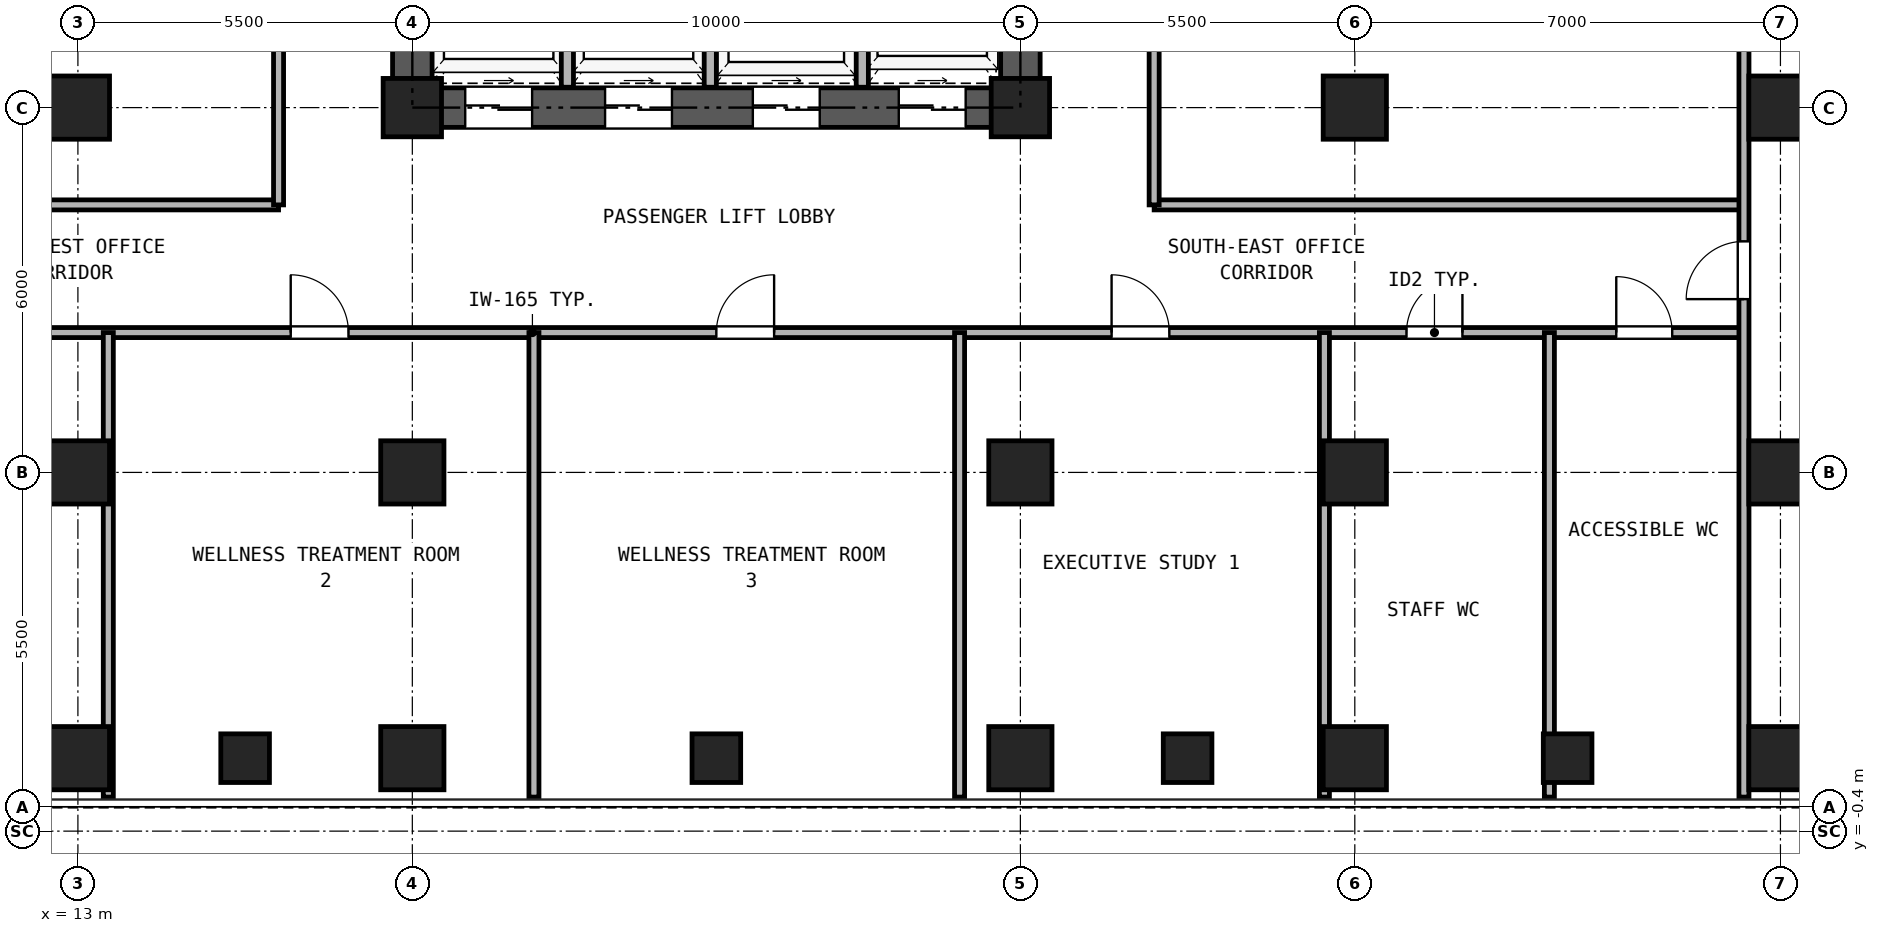
"""IFC4 building model, lengths in metres.
Left out: names, types, materials, properties, quantities, classifications, styles, units other than length and angle.
Written with IfcOpenShell. Run it as: python <this file> out.ifc"""

import sys

from ifc_helpers import new_model, si_unit, direction, frame, frame_2d, origin, origin_2d, place, context, subcontext, project, spatial, rectangle, hollow_rectangle, extrude, source, transform, mapped, element, fill, save


model = new_model("IFC4")
c1 = context("Model", 3, precision=1e-05, world=origin(), true_north=direction((0.0, 1.0)))
c2 = subcontext(c1, "Body", "Model", "MODEL_VIEW")
j1 = project(units=[si_unit("LENGTHUNIT", "METRE"), si_unit("PLANEANGLEUNIT", "RADIAN")], contexts=[c1])
p1 = place(None, origin())
s1 = spatial("IfcSite", under=j1, at=p1, CompositionType="ELEMENT")
p2 = place(p1, origin())
s2 = spatial("IfcBuilding", under=s1, at=p2, CompositionType="ELEMENT")
p3 = place(p2, frame((0.0, 0.0, 81.0)))
s3 = spatial("IfcBuildingStorey", under=s2, at=p3, CompositionType="ELEMENT", Elevation=81.0)
m1 = source(origin(), c2, "Body", "SweptSolid", [
    extrude(hollow_rectangle(XDim=1.04, YDim=1.04, WallThickness=0.065, at=origin_2d()), origin(), (0.0, 0.0, 1.0), 3.32),
])
for number, where, z_axis, x_axis in (
    (1, (13.0, 0.8, 0.0), (0.0, 0.0, 1.0), (1.0, 0.0, 0.0)),
    (2, (18.5, 0.8, 0.0), (0.0, 0.0, 1.0), (1.0, 0.0, 0.0)),
    (3, (28.5, 0.8, 0.0), (0.0, 0.0, 1.0), (1.0, 0.0, 0.0)),
    (4, (34.0, 0.8, 0.0), (0.0, 0.0, 1.0), (1.0, 0.0, 0.0)),
    (5, (41.0, 0.8, 0.0), (0.0, 0.0, 1.0), (1.0, 0.0, 0.0)),
    (6, (13.0, 5.5, 0.0), (0.0, 0.0, 1.0), (1.0, 0.0, 0.0)),
    (7, (13.0, 11.5, 0.0), (0.0, 0.0, 1.0), (1.0, 0.0, 0.0)),
    (8, (18.5, 5.5, 0.0), (0.0, 0.0, 1.0), (1.0, 0.0, 0.0)),
):
    element("IfcColumn", number, at=place(p3, frame(where, z_axis=z_axis, x_axis=x_axis)), inside=s3, PredefinedType="COLUMN", context=c2, shape_type="MappedRepresentation", body=[
        mapped(m1, transform((0.0, 0.0, 0.0), x_axis=(1.0, 0.0, 0.0), y_axis=(0.0, 1.0, 0.0), z_axis=(0.0, 0.0, 1.0), scale=1.0)),
    ])
m2 = source(origin(), c2, "Body", "SweptSolid", [
    extrude(hollow_rectangle(XDim=0.96, YDim=0.96, WallThickness=0.06, at=origin_2d()), origin(), (0.0, 0.0, 1.0), 3.32),
])
p4 = place(p3, frame((18.5, 11.5, 0.0), z_axis=(0.0, 0.0, 1.0), x_axis=(1.0, 0.0, 0.0)))
e9 = element("IfcColumn", 9, at=p4, inside=s3, PredefinedType="COLUMN", context=c2, shape_type="MappedRepresentation", body=[
    mapped(m2, transform((0.0, 0.0, 0.0), x_axis=(1.0, 0.0, 0.0), y_axis=(0.0, 1.0, 0.0), z_axis=(0.0, 0.0, 1.0), scale=1.0)),
])
p5 = place(p3, frame((28.5, 5.5, 0.0), z_axis=(0.0, 0.0, 1.0), x_axis=(1.0, 0.0, 0.0)))
e10 = element("IfcColumn", 10, at=p5, inside=s3, PredefinedType="COLUMN", context=c2, shape_type="MappedRepresentation", body=[
    mapped(m1, transform((0.0, 0.0, 0.0), x_axis=(1.0, 0.0, 0.0), y_axis=(0.0, 1.0, 0.0), z_axis=(0.0, 0.0, 1.0), scale=1.0)),
])
p6 = place(p3, frame((28.5, 11.5, 0.0), z_axis=(0.0, 0.0, 1.0), x_axis=(1.0, 0.0, 0.0)))
e11 = element("IfcColumn", 11, at=p6, inside=s3, PredefinedType="COLUMN", context=c2, shape_type="MappedRepresentation", body=[
    mapped(m2, transform((0.0, 0.0, 0.0), x_axis=(1.0, 0.0, 0.0), y_axis=(0.0, 1.0, 0.0), z_axis=(0.0, 0.0, 1.0), scale=1.0)),
])
for number, where, z_axis, x_axis in (
    (12, (34.0, 5.5, 0.0), (0.0, 0.0, 1.0), (1.0, 0.0, 0.0)),
    (13, (34.0, 11.5, 0.0), (0.0, 0.0, 1.0), (1.0, 0.0, 0.0)),
    (14, (41.0, 5.5, 0.0), (0.0, 0.0, 1.0), (1.0, 0.0, 0.0)),
    (15, (41.0, 11.5, 0.0), (0.0, 0.0, 1.0), (1.0, 0.0, 0.0)),
):
    element("IfcColumn", number, at=place(p3, frame(where, z_axis=z_axis, x_axis=x_axis)), inside=s3, PredefinedType="COLUMN", context=c2, shape_type="MappedRepresentation", body=[
        mapped(m1, transform((0.0, 0.0, 0.0), x_axis=(1.0, 0.0, 0.0), y_axis=(0.0, 1.0, 0.0), z_axis=(0.0, 0.0, 1.0), scale=1.0)),
    ])
m3 = source(origin(), c2, "Body", "SweptSolid", [
    extrude(hollow_rectangle(XDim=0.8, YDim=0.8, WallThickness=0.045, at=origin_2d()), origin(), (0.0, 0.0, 1.0), 3.32),
])
for number, where, z_axis, x_axis in (
    (16, (15.75, 0.8, 0.0), (0.0, 0.0, 1.0), (1.0, 0.0, 0.0)),
    (17, (23.5, 0.8, 0.0), (0.0, 0.0, 1.0), (1.0, 0.0, 0.0)),
    (18, (31.25, 0.8, 0.0), (0.0, 0.0, 1.0), (1.0, 0.0, 0.0)),
    (19, (37.5, 0.8, 0.0), (0.0, 0.0, 1.0), (1.0, 0.0, 0.0)),
):
    element("IfcColumn", number, at=place(p3, frame(where, z_axis=z_axis, x_axis=x_axis)), inside=s3, PredefinedType="COLUMN", context=c2, shape_type="MappedRepresentation", body=[
        mapped(m3, transform((0.0, 0.0, 0.0), x_axis=(1.0, 0.0, 0.0), y_axis=(0.0, 1.0, 0.0), z_axis=(0.0, 0.0, 1.0), scale=1.0)),
    ])
p7 = place(p3, frame((18.175, 11.5, 0.0), z_axis=(0.0, 0.0, 1.0), x_axis=(1.0, 0.0, 0.0)))
e20 = element("IfcWall", 20, at=p7, inside=s3, PredefinedType="SHEAR", context=c2, shape_type="SweptSolid", body=[
    extrude(rectangle(XDim=10.65, YDim=0.65, at=frame_2d((5.325, 0.0))), origin(), (0.0, 0.0, 1.0), 3.32),
])
p8 = place(p7, frame((1.195, 0.0, 0.0)))
e21 = element("IfcOpeningElement", 21, at=p8, cuts=e20, PredefinedType="OPENING", context=c2, shape_type="SweptSolid", body=[
    extrude(rectangle(XDim=1.1, YDim=2.25, at=frame_2d((0.55, 1.125))), frame((0.0, 0.335, 0.0), z_axis=(0.0, -1.0, 0.0), x_axis=(1.0, 0.0, 0.0)), (0.0, 0.0, 1.0), 0.67),
])
p9 = place(p7, frame((3.495, 0.0, 0.0)))
e22 = element("IfcOpeningElement", 22, at=p9, cuts=e20, PredefinedType="OPENING", context=c2, shape_type="SweptSolid", body=[
    extrude(rectangle(XDim=1.1, YDim=2.25, at=frame_2d((0.55, 1.125))), frame((0.0, 0.335, 0.0), z_axis=(0.0, -1.0, 0.0), x_axis=(1.0, 0.0, 0.0)), (0.0, 0.0, 1.0), 0.67),
])
p10 = place(p7, frame((5.925, 0.0, 0.0)))
e23 = element("IfcOpeningElement", 23, at=p10, cuts=e20, PredefinedType="OPENING", context=c2, shape_type="SweptSolid", body=[
    extrude(rectangle(XDim=1.1, YDim=2.25, at=frame_2d((0.55, 1.125))), frame((0.0, 0.335, 0.0), z_axis=(0.0, -1.0, 0.0), x_axis=(1.0, 0.0, 0.0)), (0.0, 0.0, 1.0), 0.67),
])
p11 = place(p7, frame((8.325, 0.0, 0.0)))
e24 = element("IfcOpeningElement", 24, at=p11, cuts=e20, PredefinedType="OPENING", context=c2, shape_type="SweptSolid", body=[
    extrude(rectangle(XDim=1.1, YDim=2.25, at=frame_2d((0.55, 1.125))), frame((0.0, 0.335, 0.0), z_axis=(0.0, -1.0, 0.0), x_axis=(1.0, 0.0, 0.0)), (0.0, 0.0, 1.0), 0.67),
])
p12 = place(p3, frame((18.5, 11.825, 0.0), z_axis=(0.0, 0.0, 1.0), x_axis=(0.0, 1.0, 0.0)))
e25 = element("IfcWall", 25, at=p12, inside=s3, PredefinedType="SHEAR", context=c2, shape_type="SweptSolid", body=[
    extrude(rectangle(XDim=16.6, YDim=0.65, at=frame_2d((8.3, 0.0))), origin(), (0.0, 0.0, 1.0), 3.32),
])
p13 = place(p12, frame((7.325, 0.0, 0.0)))
e26 = element("IfcOpeningElement", 26, at=p13, cuts=e25, PredefinedType="OPENING", context=c2, shape_type="SweptSolid", body=[
    extrude(rectangle(XDim=1.15, YDim=2.2, at=frame_2d((0.575, 1.1))), frame((0.0, 0.335, 0.0), z_axis=(0.0, -1.0, 0.0), x_axis=(1.0, 0.0, 0.0)), (0.0, 0.0, 1.0), 0.67),
])
p14 = place(p3, frame((28.5, 11.825, 0.0), z_axis=(0.0, 0.0, 1.0), x_axis=(0.0, 1.0, 0.0)))
e27 = element("IfcWall", 27, at=p14, inside=s3, PredefinedType="SHEAR", context=c2, shape_type="SweptSolid", body=[
    extrude(rectangle(XDim=16.6, YDim=0.65, at=frame_2d((8.3, 0.0))), origin(), (0.0, 0.0, 1.0), 3.32),
])
p15 = place(p14, frame((7.325, 0.0, 0.0)))
e28 = element("IfcOpeningElement", 28, at=p15, cuts=e27, PredefinedType="OPENING", context=c2, shape_type="SweptSolid", body=[
    extrude(rectangle(XDim=1.15, YDim=2.2, at=frame_2d((0.575, 1.1))), frame((0.0, 0.335, 0.0), z_axis=(0.0, -1.0, 0.0), x_axis=(1.0, 0.0, 0.0)), (0.0, 0.0, 1.0), 0.67),
])
for number, where, z_axis, x_axis in (
    (29, (21.05, 11.835, 0.0), (0.0, 0.0, 1.0), (0.0, 1.0, 0.0)),
    (30, (23.4, 11.835, 0.0), (0.0, 0.0, 1.0), (0.0, 1.0, 0.0)),
    (31, (25.9, 11.835, 0.0), (0.0, 0.0, 1.0), (0.0, 1.0, 0.0)),
):
    element("IfcWall", number, at=place(p3, frame(where, z_axis=z_axis, x_axis=x_axis)), inside=s3, PredefinedType="PARTITIONING", context=c2, shape_type="SweptSolid", body=[
        extrude(rectangle(XDim=3.165, YDim=0.2, at=frame_2d((1.583, 0.0))), origin(), (0.0, 0.0, 1.0), 3.32),
    ])
p16 = place(p3, frame((6.6, 7.8, 0.0), z_axis=(0.0, 0.0, 1.0), x_axis=(1.0, 0.0, 0.0)))
e32 = element("IfcWall", 32, at=p16, inside=s3, PredefinedType="PARTITIONING", context=c2, shape_type="SweptSolid", body=[
    extrude(rectangle(XDim=33.8, YDim=0.165, at=frame_2d((16.9, 0.0))), origin(), (0.0, 0.0, 1.0), 3.32),
])
p17 = place(p16, frame((2.95, 0.0, 0.0)))
e33 = element("IfcOpeningElement", 33, at=p17, cuts=e32, PredefinedType="OPENING", context=c2, shape_type="SweptSolid", body=[
    extrude(rectangle(XDim=0.95, YDim=2.15, at=frame_2d((0.475, 1.075))), frame((0.0, 0.093, 0.0), z_axis=(0.0, -1.0, 0.0), x_axis=(1.0, 0.0, 0.0)), (0.0, 0.0, 1.0), 0.185),
])
p18 = place(p16, frame((9.9, 0.0, 0.0)))
e34 = element("IfcOpeningElement", 34, at=p18, cuts=e32, PredefinedType="OPENING", context=c2, shape_type="SweptSolid", body=[
    extrude(rectangle(XDim=0.95, YDim=2.15, at=frame_2d((0.475, 1.075))), frame((0.0, 0.093, 0.0), z_axis=(0.0, -1.0, 0.0), x_axis=(1.0, 0.0, 0.0)), (0.0, 0.0, 1.0), 0.185),
])
p19 = place(p16, frame((16.9, 0.0, 0.0)))
e35 = element("IfcOpeningElement", 35, at=p19, cuts=e32, PredefinedType="OPENING", context=c2, shape_type="SweptSolid", body=[
    extrude(rectangle(XDim=0.95, YDim=2.15, at=frame_2d((0.475, 1.075))), frame((0.0, 0.093, 0.0), z_axis=(0.0, -1.0, 0.0), x_axis=(1.0, 0.0, 0.0)), (0.0, 0.0, 1.0), 0.185),
])
p20 = place(p16, frame((23.4, 0.0, 0.0)))
e36 = element("IfcOpeningElement", 36, at=p20, cuts=e32, PredefinedType="OPENING", context=c2, shape_type="SweptSolid", body=[
    extrude(rectangle(XDim=0.95, YDim=2.15, at=frame_2d((0.475, 1.075))), frame((0.0, 0.093, 0.0), z_axis=(0.0, -1.0, 0.0), x_axis=(1.0, 0.0, 0.0)), (0.0, 0.0, 1.0), 0.185),
])
p21 = place(p16, frame((28.25, 0.0, 0.0)))
e37 = element("IfcOpeningElement", 37, at=p21, cuts=e32, PredefinedType="OPENING", context=c2, shape_type="SweptSolid", body=[
    extrude(rectangle(XDim=0.92, YDim=2.1, at=frame_2d((0.46, 1.05))), frame((0.0, 0.093, 0.0), z_axis=(0.0, -1.0, 0.0), x_axis=(1.0, 0.0, 0.0)), (0.0, 0.0, 1.0), 0.185),
])
p22 = place(p16, frame((31.7, 0.0, 0.0)))
e38 = element("IfcOpeningElement", 38, at=p22, cuts=e32, PredefinedType="OPENING", context=c2, shape_type="SweptSolid", body=[
    extrude(rectangle(XDim=0.92, YDim=2.1, at=frame_2d((0.46, 1.05))), frame((0.0, 0.093, 0.0), z_axis=(0.0, -1.0, 0.0), x_axis=(1.0, 0.0, 0.0)), (0.0, 0.0, 1.0), 0.185),
])
for number, where, z_axis, x_axis in (
    (39, (6.6, 9.9, 0.0), (0.0, 0.0, 1.0), (1.0, 0.0, 0.0)),
    (40, (30.7, 9.9, 0.0), (0.0, 0.0, 1.0), (1.0, 0.0, 0.0)),
):
    element("IfcWall", number, at=place(p3, frame(where, z_axis=z_axis, x_axis=x_axis)), inside=s3, PredefinedType="PARTITIONING", context=c2, shape_type="SweptSolid", body=[
        extrude(rectangle(XDim=9.7, YDim=0.165, at=frame_2d((4.85, 0.0))), origin(), (0.0, 0.0, 1.0), 3.32),
    ])
p23 = place(p3, frame((16.3, 9.9, 0.0), z_axis=(0.0, 0.0, 1.0), x_axis=(0.0, 1.0, 0.0)))
e41 = element("IfcWall", 41, at=p23, inside=s3, PredefinedType="PARTITIONING", context=c2, shape_type="SweptSolid", body=[
    extrude(rectangle(XDim=19.95, YDim=0.165, at=frame_2d((9.975, 0.0))), origin(), (0.0, 0.0, 1.0), 3.32),
])
p24 = place(p23, frame((5.937, 0.0, 0.0)))
e42 = element("IfcOpeningElement", 42, at=p24, cuts=e41, PredefinedType="OPENING", context=c2, shape_type="SweptSolid", body=[
    extrude(rectangle(XDim=0.95, YDim=2.15, at=frame_2d((0.475, 1.075))), frame((0.0, 0.093, 0.0), z_axis=(0.0, -1.0, 0.0), x_axis=(1.0, 0.0, 0.0)), (0.0, 0.0, 1.0), 0.185),
])
p25 = place(p23, frame((15.911, 0.0, 0.0)))
e43 = element("IfcOpeningElement", 43, at=p25, cuts=e41, PredefinedType="OPENING", context=c2, shape_type="SweptSolid", body=[
    extrude(rectangle(XDim=0.95, YDim=2.15, at=frame_2d((0.475, 1.075))), frame((0.0, 0.093, 0.0), z_axis=(0.0, -1.0, 0.0), x_axis=(1.0, 0.0, 0.0)), (0.0, 0.0, 1.0), 0.185),
])
p26 = place(p3, frame((30.7, 9.9, 0.0), z_axis=(0.0, 0.0, 1.0), x_axis=(0.0, 1.0, 0.0)))
e44 = element("IfcWall", 44, at=p26, inside=s3, PredefinedType="PARTITIONING", context=c2, shape_type="SweptSolid", body=[
    extrude(rectangle(XDim=19.95, YDim=0.165, at=frame_2d((9.975, 0.0))), origin(), (0.0, 0.0, 1.0), 3.32),
])
p27 = place(p26, frame((9.475, 0.0, 0.0)))
e45 = element("IfcOpeningElement", 45, at=p27, cuts=e44, PredefinedType="OPENING", context=c2, shape_type="SweptSolid", body=[
    extrude(rectangle(XDim=0.95, YDim=2.15, at=frame_2d((0.475, 1.075))), frame((0.0, 0.093, 0.0), z_axis=(0.0, -1.0, 0.0), x_axis=(1.0, 0.0, 0.0)), (0.0, 0.0, 1.0), 0.185),
])
p28 = place(p3, frame((40.4, 0.16, 0.0), z_axis=(0.0, 0.0, 1.0), x_axis=(0.0, 1.0, 0.0)))
e46 = element("IfcWall", 46, at=p28, inside=s3, PredefinedType="PARTITIONING", context=c2, shape_type="SweptSolid", body=[
    extrude(rectangle(XDim=40.18, YDim=0.165, at=frame_2d((20.09, 0.0))), origin(), (0.0, 0.0, 1.0), 3.32),
])
p29 = place(p28, frame((8.19, 0.0, 0.0)))
e47 = element("IfcOpeningElement", 47, at=p29, cuts=e46, PredefinedType="OPENING", context=c2, shape_type="SweptSolid", body=[
    extrude(rectangle(XDim=0.95, YDim=2.15, at=frame_2d((0.475, 1.075))), frame((0.0, 0.093, 0.0), z_axis=(0.0, -1.0, 0.0), x_axis=(1.0, 0.0, 0.0)), (0.0, 0.0, 1.0), 0.185),
])
p30 = place(p28, frame((30.24, 0.0, 0.0)))
e48 = element("IfcOpeningElement", 48, at=p30, cuts=e46, PredefinedType="OPENING", context=c2, shape_type="SweptSolid", body=[
    extrude(rectangle(XDim=0.95, YDim=2.15, at=frame_2d((0.475, 1.075))), frame((0.0, 0.093, 0.0), z_axis=(0.0, -1.0, 0.0), x_axis=(1.0, 0.0, 0.0)), (0.0, 0.0, 1.0), 0.185),
])
for number, where, z_axis, x_axis in (
    (49, (13.5, 0.16, 0.0), (0.0, 0.0, 1.0), (0.0, 1.0, 0.0)),
    (50, (20.5, 0.16, 0.0), (0.0, 0.0, 1.0), (0.0, 1.0, 0.0)),
    (51, (27.5, 0.16, 0.0), (0.0, 0.0, 1.0), (0.0, 1.0, 0.0)),
    (52, (33.5, 0.16, 0.0), (0.0, 0.0, 1.0), (0.0, 1.0, 0.0)),
    (53, (37.2, 0.16, 0.0), (0.0, 0.0, 1.0), (0.0, 1.0, 0.0)),
):
    element("IfcWall", number, at=place(p3, frame(where, z_axis=z_axis, x_axis=x_axis)), inside=s3, PredefinedType="PARTITIONING", context=c2, shape_type="SweptSolid", body=[
        extrude(rectangle(XDim=7.64, YDim=0.165, at=frame_2d((3.82, 0.0))), origin(), (0.0, 0.0, 1.0), 3.32),
    ])
p31 = place(p8, frame((1.1, 0.0, 0.0), z_axis=(0.0, 0.0, 1.0), x_axis=(-1.0, 0.0, 0.0)))
e54 = element("IfcDoor", 54, at=p31, inside=s3, OperationType="DOUBLE_DOOR_SLIDING", PredefinedType="DOOR", context=c2, shape_type="SweptSolid", body=[
    extrude(rectangle(XDim=1.1, YDim=2.25, at=frame_2d((0.55, 1.125))), frame((0.0, 0.025, 0.0), z_axis=(0.0, -1.0, 0.0), x_axis=(1.0, 0.0, 0.0)), (0.0, 0.0, 1.0), 0.05),
])
fill(e21, e54)
p32 = place(p9, frame((1.1, 0.0, 0.0), z_axis=(0.0, 0.0, 1.0), x_axis=(-1.0, 0.0, 0.0)))
e55 = element("IfcDoor", 55, at=p32, inside=s3, OperationType="DOUBLE_DOOR_SLIDING", PredefinedType="DOOR", context=c2, shape_type="SweptSolid", body=[
    extrude(rectangle(XDim=1.1, YDim=2.25, at=frame_2d((0.55, 1.125))), frame((0.0, 0.025, 0.0), z_axis=(0.0, -1.0, 0.0), x_axis=(1.0, 0.0, 0.0)), (0.0, 0.0, 1.0), 0.05),
])
fill(e22, e55)
p33 = place(p10, frame((1.1, 0.0, 0.0), z_axis=(0.0, 0.0, 1.0), x_axis=(-1.0, 0.0, 0.0)))
e56 = element("IfcDoor", 56, at=p33, inside=s3, OperationType="DOUBLE_DOOR_SLIDING", PredefinedType="DOOR", context=c2, shape_type="SweptSolid", body=[
    extrude(rectangle(XDim=1.1, YDim=2.25, at=frame_2d((0.55, 1.125))), frame((0.0, 0.025, 0.0), z_axis=(0.0, -1.0, 0.0), x_axis=(1.0, 0.0, 0.0)), (0.0, 0.0, 1.0), 0.05),
])
fill(e23, e56)
p34 = place(p11, frame((1.1, 0.0, 0.0), z_axis=(0.0, 0.0, 1.0), x_axis=(-1.0, 0.0, 0.0)))
e57 = element("IfcDoor", 57, at=p34, inside=s3, OperationType="DOUBLE_DOOR_SLIDING", PredefinedType="DOOR", context=c2, shape_type="SweptSolid", body=[
    extrude(rectangle(XDim=1.1, YDim=2.25, at=frame_2d((0.55, 1.125))), frame((0.0, 0.025, 0.0), z_axis=(0.0, -1.0, 0.0), x_axis=(1.0, 0.0, 0.0)), (0.0, 0.0, 1.0), 0.05),
])
fill(e24, e57)
p35 = place(p18, frame((0.95, 0.0, 0.0), z_axis=(0.0, 0.0, 1.0), x_axis=(-1.0, 0.0, 0.0)))
e58 = element("IfcDoor", 58, at=p35, inside=s3, OperationType="SINGLE_SWING_LEFT", PredefinedType="DOOR", context=c2, shape_type="SweptSolid", body=[
    extrude(rectangle(XDim=0.95, YDim=2.15, at=frame_2d((0.475, 1.075))), frame((0.0, 0.025, 0.0), z_axis=(0.0, -1.0, 0.0), x_axis=(1.0, 0.0, 0.0)), (0.0, 0.0, 1.0), 0.05),
])
fill(e34, e58)
p36 = place(p19, frame((0.95, 0.0, 0.0), z_axis=(0.0, 0.0, 1.0), x_axis=(-1.0, 0.0, 0.0)))
e59 = element("IfcDoor", 59, at=p36, inside=s3, OperationType="SINGLE_SWING_RIGHT", PredefinedType="DOOR", context=c2, shape_type="SweptSolid", body=[
    extrude(rectangle(XDim=0.95, YDim=2.15, at=frame_2d((0.475, 1.075))), frame((0.0, 0.025, 0.0), z_axis=(0.0, -1.0, 0.0), x_axis=(1.0, 0.0, 0.0)), (0.0, 0.0, 1.0), 0.05),
])
fill(e35, e59)
p37 = place(p20, frame((0.95, 0.0, 0.0), z_axis=(0.0, 0.0, 1.0), x_axis=(-1.0, 0.0, 0.0)))
e60 = element("IfcDoor", 60, at=p37, inside=s3, OperationType="SINGLE_SWING_LEFT", PredefinedType="DOOR", context=c2, shape_type="SweptSolid", body=[
    extrude(rectangle(XDim=0.95, YDim=2.15, at=frame_2d((0.475, 1.075))), frame((0.0, 0.025, 0.0), z_axis=(0.0, -1.0, 0.0), x_axis=(1.0, 0.0, 0.0)), (0.0, 0.0, 1.0), 0.05),
])
fill(e36, e60)
p38 = place(p21, frame((0.92, 0.0, 0.0), z_axis=(0.0, 0.0, 1.0), x_axis=(-1.0, 0.0, 0.0)))
e61 = element("IfcDoor", 61, at=p38, inside=s3, OperationType="SINGLE_SWING_RIGHT", PredefinedType="DOOR", context=c2, shape_type="SweptSolid", body=[
    extrude(rectangle(XDim=0.92, YDim=2.1, at=frame_2d((0.46, 1.05))), frame((0.0, 0.025, 0.0), z_axis=(0.0, -1.0, 0.0), x_axis=(1.0, 0.0, 0.0)), (0.0, 0.0, 1.0), 0.05),
])
fill(e37, e61)
p39 = place(p22, frame((0.92, 0.0, 0.0), z_axis=(0.0, 0.0, 1.0), x_axis=(-1.0, 0.0, 0.0)))
e62 = element("IfcDoor", 62, at=p39, inside=s3, OperationType="SINGLE_SWING_LEFT", PredefinedType="DOOR", context=c2, shape_type="SweptSolid", body=[
    extrude(rectangle(XDim=0.92, YDim=2.1, at=frame_2d((0.46, 1.05))), frame((0.0, 0.025, 0.0), z_axis=(0.0, -1.0, 0.0), x_axis=(1.0, 0.0, 0.0)), (0.0, 0.0, 1.0), 0.05),
])
fill(e38, e62)
p40 = place(p29, origin())
e63 = element("IfcDoor", 63, at=p40, inside=s3, OperationType="SINGLE_SWING_LEFT", PredefinedType="DOOR", context=c2, shape_type="SweptSolid", body=[
    extrude(rectangle(XDim=0.95, YDim=2.15, at=frame_2d((0.475, 1.075))), frame((0.0, 0.025, 0.0), z_axis=(0.0, -1.0, 0.0), x_axis=(1.0, 0.0, 0.0)), (0.0, 0.0, 1.0), 0.05),
])
fill(e47, e63)
save(model, sys.argv[1])
